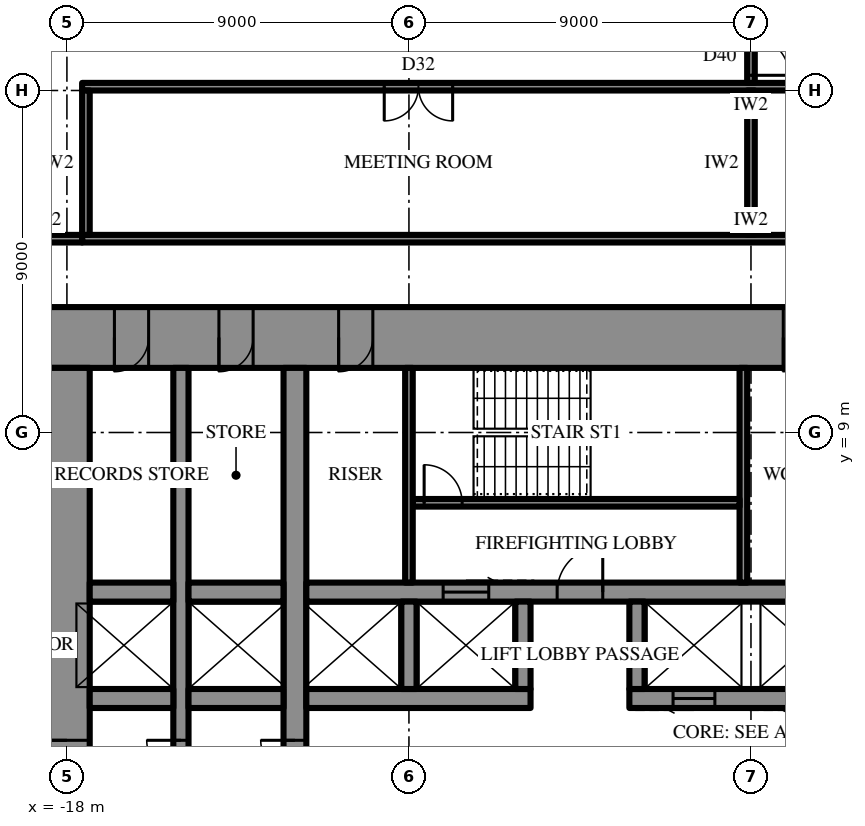
"""IFC4 building model, lengths in metres.
Left out: names, types, materials, properties, quantities, classifications, styles, units other than length and angle.
Written with IfcOpenShell. Run it as: python <this file> out.ifc"""

import sys

from ifc_helpers import new_model, si_unit, direction, frame, frame_2d, origin, place, context, subcontext, project, spatial, rectangle, extrude, element, fill, save


model = new_model("IFC4")
c1 = context("Model", 3, precision=1e-05, world=origin(), true_north=direction((0.0, 1.0)))
c2 = subcontext(c1, "Body", "Model", "MODEL_VIEW")
j1 = project(units=[si_unit("LENGTHUNIT", "METRE"), si_unit("PLANEANGLEUNIT", "RADIAN")], contexts=[c1])
p1 = place(None, origin())
s1 = spatial("IfcSite", under=j1, at=p1, CompositionType="ELEMENT")
p2 = place(p1, origin())
s2 = spatial("IfcBuilding", under=s1, at=p2, CompositionType="ELEMENT")
p3 = place(p2, frame((0.0, 0.0, 31.9)))
s3 = spatial("IfcBuildingStorey", under=s2, at=p3, CompositionType="ELEMENT", Elevation=31.9)
p4 = place(p3, frame((-18.6, 11.5, 0.0), z_axis=(0.0, 0.0, 1.0), x_axis=(1.0, 0.0, 0.0)))
e1 = element("IfcWall", 1, at=p4, inside=s3, PredefinedType="SHEAR", context=c2, shape_type="SweptSolid", body=[
    extrude(rectangle(XDim=37.2, YDim=1.6, at=frame_2d((18.6, 0.0))), origin(), (0.0, 0.0, 1.0), 4.2),
])
p5 = place(p4, frame((19.45, 0.0, 0.0)))
e2 = element("IfcOpeningElement", 2, at=p5, cuts=e1, PredefinedType="OPENING", context=c2, shape_type="SweptSolid", body=[
    extrude(rectangle(XDim=0.9, YDim=2.2, at=frame_2d((0.45, 1.1))), frame((0.0, 0.81, 0.0), z_axis=(0.0, -1.0, 0.0), x_axis=(1.0, 0.0, 0.0)), (0.0, 0.0, 1.0), 1.62),
])
p6 = place(p4, frame((22.45, 0.0, 0.0)))
e3 = element("IfcOpeningElement", 3, at=p6, cuts=e1, PredefinedType="OPENING", context=c2, shape_type="SweptSolid", body=[
    extrude(rectangle(XDim=0.9, YDim=2.2, at=frame_2d((0.45, 1.1))), frame((0.0, 0.81, 0.0), z_axis=(0.0, -1.0, 0.0), x_axis=(1.0, 0.0, 0.0)), (0.0, 0.0, 1.0), 1.62),
])
p7 = place(p4, frame((25.5, 0.0, 0.0)))
e4 = element("IfcOpeningElement", 4, at=p7, cuts=e1, PredefinedType="OPENING", context=c2, shape_type="SweptSolid", body=[
    extrude(rectangle(XDim=1.0, YDim=2.2, at=frame_2d((0.5, 1.1))), frame((0.0, 0.81, 0.0), z_axis=(0.0, -1.0, 0.0), x_axis=(1.0, 0.0, 0.0)), (0.0, 0.0, 1.0), 1.62),
])
p8 = place(p4, frame((1.85, 0.0, 0.0)))
e5 = element("IfcOpeningElement", 5, at=p8, cuts=e1, PredefinedType="OPENING", context=c2, shape_type="SweptSolid", body=[
    extrude(rectangle(XDim=0.9, YDim=2.2, at=frame_2d((0.45, 1.1))), frame((0.0, 0.81, 0.0), z_axis=(0.0, -1.0, 0.0), x_axis=(1.0, 0.0, 0.0)), (0.0, 0.0, 1.0), 1.62),
])
p9 = place(p4, frame((4.6, 0.0, 0.0)))
e6 = element("IfcOpeningElement", 6, at=p9, cuts=e1, PredefinedType="OPENING", context=c2, shape_type="SweptSolid", body=[
    extrude(rectangle(XDim=0.9, YDim=2.2, at=frame_2d((0.45, 1.1))), frame((0.0, 0.81, 0.0), z_axis=(0.0, -1.0, 0.0), x_axis=(1.0, 0.0, 0.0)), (0.0, 0.0, 1.0), 1.62),
])
p10 = place(p4, frame((7.75, 0.0, 0.0)))
e7 = element("IfcOpeningElement", 7, at=p10, cuts=e1, PredefinedType="OPENING", context=c2, shape_type="SweptSolid", body=[
    extrude(rectangle(XDim=0.9, YDim=2.2, at=frame_2d((0.45, 1.1))), frame((0.0, 0.81, 0.0), z_axis=(0.0, -1.0, 0.0), x_axis=(1.0, 0.0, 0.0)), (0.0, 0.0, 1.0), 1.62),
])
p11 = place(p4, frame((28.55, 0.0, 0.0)))
e8 = element("IfcOpeningElement", 8, at=p11, cuts=e1, PredefinedType="OPENING", context=c2, shape_type="SweptSolid", body=[
    extrude(rectangle(XDim=0.9, YDim=2.2, at=frame_2d((0.45, 1.1))), frame((0.0, 0.81, 0.0), z_axis=(0.0, -1.0, 0.0), x_axis=(1.0, 0.0, 0.0)), (0.0, 0.0, 1.0), 1.62),
])
p12 = place(p4, frame((31.7, 0.0, 0.0)))
e9 = element("IfcOpeningElement", 9, at=p12, cuts=e1, PredefinedType="OPENING", context=c2, shape_type="SweptSolid", body=[
    extrude(rectangle(XDim=0.9, YDim=2.2, at=frame_2d((0.45, 1.1))), frame((0.0, 0.81, 0.0), z_axis=(0.0, -1.0, 0.0), x_axis=(1.0, 0.0, 0.0)), (0.0, 0.0, 1.0), 1.62),
])
p13 = place(p4, frame((34.45, 0.0, 0.0)))
e10 = element("IfcOpeningElement", 10, at=p13, cuts=e1, PredefinedType="OPENING", context=c2, shape_type="SweptSolid", body=[
    extrude(rectangle(XDim=0.9, YDim=2.2, at=frame_2d((0.45, 1.1))), frame((0.0, 0.81, 0.0), z_axis=(0.0, -1.0, 0.0), x_axis=(1.0, 0.0, 0.0)), (0.0, 0.0, 1.0), 1.62),
])
p14 = place(p3, frame((-18.0, 10.7, 0.0), z_axis=(0.0, 0.0, 1.0), x_axis=(0.0, -1.0, 0.0)))
e11 = element("IfcWall", 11, at=p14, inside=s3, PredefinedType="SHEAR", context=c2, shape_type="SweptSolid", body=[
    extrude(rectangle(XDim=21.4, YDim=1.2, at=frame_2d((10.7, 0.0))), origin(), (0.0, 0.0, 1.0), 4.2),
])
p15 = place(p14, frame((9.8, 0.0, 0.0)))
e12 = element("IfcOpeningElement", 12, at=p15, cuts=e11, PredefinedType="OPENING", context=c2, shape_type="SweptSolid", body=[
    extrude(rectangle(XDim=1.8, YDim=2.4, at=frame_2d((0.9, 1.2))), frame((0.0, 0.61, 0.0), z_axis=(0.0, -1.0, 0.0), x_axis=(1.0, 0.0, 0.0)), (0.0, 0.0, 1.0), 1.22),
])
p16 = place(p3, frame((-12.0, -10.7, 0.0), z_axis=(0.0, 0.0, 1.0), x_axis=(0.0, 1.0, 0.0)))
e13 = element("IfcWall", 13, at=p16, inside=s3, PredefinedType="SHEAR", context=c2, shape_type="SweptSolid", body=[
    extrude(rectangle(XDim=21.4, YDim=0.6, at=frame_2d((10.7, 0.0))), origin(), (0.0, 0.0, 1.0), 4.2),
])
p17 = place(p16, frame((9.8, 0.0, 0.0)))
e14 = element("IfcOpeningElement", 14, at=p17, cuts=e13, PredefinedType="OPENING", context=c2, shape_type="SweptSolid", body=[
    extrude(rectangle(XDim=1.8, YDim=2.4, at=frame_2d((0.9, 1.2))), frame((0.0, 0.31, 0.0), z_axis=(0.0, -1.0, 0.0), x_axis=(1.0, 0.0, 0.0)), (0.0, 0.0, 1.0), 0.62),
])
p18 = place(p3, frame((-15.0, -10.7, 0.0), z_axis=(0.0, 0.0, 1.0), x_axis=(0.0, 1.0, 0.0)))
e15 = element("IfcWall", 15, at=p18, inside=s3, PredefinedType="SHEAR", context=c2, shape_type="SweptSolid", body=[
    extrude(rectangle(XDim=21.4, YDim=0.4, at=frame_2d((10.7, 0.0))), origin(), (0.0, 0.0, 1.0), 4.2),
])
p19 = place(p18, frame((9.8, 0.0, 0.0)))
e16 = element("IfcOpeningElement", 16, at=p19, cuts=e15, PredefinedType="OPENING", context=c2, shape_type="SweptSolid", body=[
    extrude(rectangle(XDim=1.8, YDim=2.4, at=frame_2d((0.9, 1.2))), frame((0.0, 0.21, 0.0), z_axis=(0.0, -1.0, 0.0), x_axis=(1.0, 0.0, 0.0)), (0.0, 0.0, 1.0), 0.42),
])
p20 = place(p3, frame((-17.4, 2.0, 0.0), z_axis=(0.0, 0.0, 1.0), x_axis=(1.0, 0.0, 0.0)))
e17 = element("IfcWall", 17, at=p20, inside=s3, PredefinedType="SHEAR", context=c2, shape_type="SweptSolid", body=[
    extrude(rectangle(XDim=2.2, YDim=0.5, at=frame_2d((1.1, 0.0))), origin(), (0.0, 0.0, 1.0), 4.2),
])
p21 = place(p3, frame((-14.8, 2.0, 0.0), z_axis=(0.0, 0.0, 1.0), x_axis=(1.0, 0.0, 0.0)))
e18 = element("IfcWall", 18, at=p21, inside=s3, PredefinedType="SHEAR", context=c2, shape_type="SweptSolid", body=[
    extrude(rectangle(XDim=2.5, YDim=0.5, at=frame_2d((1.25, 0.0))), origin(), (0.0, 0.0, 1.0), 4.2),
])
p22 = place(p3, frame((-11.7, 2.0, 0.0), z_axis=(0.0, 0.0, 1.0), x_axis=(1.0, 0.0, 0.0)))
e19 = element("IfcWall", 19, at=p22, inside=s3, PredefinedType="SHEAR", context=c2, shape_type="SweptSolid", body=[
    extrude(rectangle(XDim=5.9, YDim=0.5, at=frame_2d((2.95, 0.0))), origin(), (0.0, 0.0, 1.0), 4.2),
])
p23 = place(p3, frame((-3.2, 2.0, 0.0), z_axis=(0.0, 0.0, 1.0), x_axis=(1.0, 0.0, 0.0)))
e20 = element("IfcWall", 20, at=p23, inside=s3, PredefinedType="SHEAR", context=c2, shape_type="SweptSolid", body=[
    extrude(rectangle(XDim=14.9, YDim=0.5, at=frame_2d((7.45, 0.0))), origin(), (0.0, 0.0, 1.0), 4.2),
])
p24 = place(p23, frame((1.15, 0.0, 0.0)))
e21 = element("IfcOpeningElement", 21, at=p24, cuts=e20, PredefinedType="OPENING", context=c2, shape_type="SweptSolid", body=[
    extrude(rectangle(XDim=1.1, YDim=2.2, at=frame_2d((0.55, 1.1))), frame((0.0, 0.26, 0.0), z_axis=(0.0, -1.0, 0.0), x_axis=(1.0, 0.0, 0.0)), (0.0, 0.0, 1.0), 0.52),
])
p25 = place(p23, frame((4.15, 0.0, 0.0)))
e22 = element("IfcOpeningElement", 22, at=p25, cuts=e20, PredefinedType="OPENING", context=c2, shape_type="SweptSolid", body=[
    extrude(rectangle(XDim=1.1, YDim=2.2, at=frame_2d((0.55, 1.1))), frame((0.0, 0.26, 0.0), z_axis=(0.0, -1.0, 0.0), x_axis=(1.0, 0.0, 0.0)), (0.0, 0.0, 1.0), 0.52),
])
p26 = place(p23, frame((7.15, 0.0, 0.0)))
e23 = element("IfcOpeningElement", 23, at=p26, cuts=e20, PredefinedType="OPENING", context=c2, shape_type="SweptSolid", body=[
    extrude(rectangle(XDim=1.1, YDim=2.2, at=frame_2d((0.55, 1.1))), frame((0.0, 0.26, 0.0), z_axis=(0.0, -1.0, 0.0), x_axis=(1.0, 0.0, 0.0)), (0.0, 0.0, 1.0), 0.52),
])
p27 = place(p23, frame((10.15, 0.0, 0.0)))
e24 = element("IfcOpeningElement", 24, at=p27, cuts=e20, PredefinedType="OPENING", context=c2, shape_type="SweptSolid", body=[
    extrude(rectangle(XDim=1.1, YDim=2.2, at=frame_2d((0.55, 1.1))), frame((0.0, 0.26, 0.0), z_axis=(0.0, -1.0, 0.0), x_axis=(1.0, 0.0, 0.0)), (0.0, 0.0, 1.0), 0.52),
])
p28 = place(p3, frame((-17.4, 4.8, 0.0), z_axis=(0.0, 0.0, 1.0), x_axis=(1.0, 0.0, 0.0)))
e25 = element("IfcWall", 25, at=p28, inside=s3, PredefinedType="SHEAR", context=c2, shape_type="SweptSolid", body=[
    extrude(rectangle(XDim=2.2, YDim=0.5, at=frame_2d((1.1, 0.0))), origin(), (0.0, 0.0, 1.0), 4.2),
])
p29 = place(p3, frame((-14.8, 4.8, 0.0), z_axis=(0.0, 0.0, 1.0), x_axis=(1.0, 0.0, 0.0)))
e26 = element("IfcWall", 26, at=p29, inside=s3, PredefinedType="SHEAR", context=c2, shape_type="SweptSolid", body=[
    extrude(rectangle(XDim=2.5, YDim=0.5, at=frame_2d((1.25, 0.0))), origin(), (0.0, 0.0, 1.0), 4.2),
])
p30 = place(p3, frame((-11.7, 4.8, 0.0), z_axis=(0.0, 0.0, 1.0), x_axis=(1.0, 0.0, 0.0)))
e27 = element("IfcWall", 27, at=p30, inside=s3, PredefinedType="SHEAR", context=c2, shape_type="SweptSolid", body=[
    extrude(rectangle(XDim=23.4, YDim=0.5, at=frame_2d((11.7, 0.0))), origin(), (0.0, 0.0, 1.0), 4.2),
])
p31 = place(p30, frame((6.6, 0.0, 0.0)))
e28 = element("IfcOpeningElement", 28, at=p31, cuts=e27, PredefinedType="OPENING", context=c2, shape_type="SweptSolid", body=[
    extrude(rectangle(XDim=1.2, YDim=2.2, at=frame_2d((0.6, 1.1))), frame((0.0, 0.26, 0.0), z_axis=(0.0, -1.0, 0.0), x_axis=(1.0, 0.0, 0.0)), (0.0, 0.0, 1.0), 0.52),
])
p32 = place(p30, frame((3.6, 0.0, 0.0)))
e29 = element("IfcOpeningElement", 29, at=p32, cuts=e27, PredefinedType="OPENING", context=c2, shape_type="SweptSolid", body=[
    extrude(rectangle(XDim=1.2, YDim=2.2, at=frame_2d((0.6, 1.1))), frame((0.0, 0.26, 0.0), z_axis=(0.0, -1.0, 0.0), x_axis=(1.0, 0.0, 0.0)), (0.0, 0.0, 1.0), 0.52),
])
for number, where, z_axis, x_axis in (
    (30, (-9.0, 2.25, 0.0), (0.0, 0.0, 1.0), (0.0, 1.0, 0.0)),
    (31, (-6.0, 2.25, 0.0), (0.0, 0.0, 1.0), (0.0, 1.0, 0.0)),
    (32, (-3.0, 2.25, 0.0), (0.0, 0.0, 1.0), (0.0, 1.0, 0.0)),
):
    element("IfcWall", number, at=place(p3, frame(where, z_axis=z_axis, x_axis=x_axis)), inside=s3, PredefinedType="SHEAR", context=c2, shape_type="SweptSolid", body=[
        extrude(rectangle(XDim=2.3, YDim=0.4, at=frame_2d((1.15, 0.0))), origin(), (0.0, 0.0, 1.0), 4.2),
    ])
p33 = place(p3, frame((-0.2, 5.05, 0.0), z_axis=(0.0, 0.0, 1.0), x_axis=(0.0, 1.0, 0.0)))
e33 = element("IfcWall", 33, at=p33, inside=s3, PredefinedType="SHEAR", context=c2, shape_type="SweptSolid", body=[
    extrude(rectangle(XDim=5.65, YDim=0.2, at=frame_2d((2.825, 0.0))), origin(), (0.0, 0.0, 1.0), 4.2),
])
p34 = place(p3, frame((-8.9, 7.15, 0.0), z_axis=(0.0, 0.0, 1.0), x_axis=(1.0, 0.0, 0.0)))
e34 = element("IfcWall", 34, at=p34, inside=s3, PredefinedType="SHEAR", context=c2, shape_type="SweptSolid", body=[
    extrude(rectangle(XDim=8.6, YDim=0.2, at=frame_2d((4.3, 0.0))), origin(), (0.0, 0.0, 1.0), 4.2),
])
p35 = place(p34, frame((0.3, 0.0, 0.0)))
e35 = element("IfcOpeningElement", 35, at=p35, cuts=e34, PredefinedType="OPENING", context=c2, shape_type="SweptSolid", body=[
    extrude(rectangle(XDim=1.0, YDim=2.2, at=frame_2d((0.5, 1.1))), frame((0.0, 0.11, 0.0), z_axis=(0.0, -1.0, 0.0), x_axis=(1.0, 0.0, 0.0)), (0.0, 0.0, 1.0), 0.22),
])
p36 = place(p3, frame((-9.0, 5.05, 0.0), z_axis=(0.0, 0.0, 1.0), x_axis=(0.0, 1.0, 0.0)))
e36 = element("IfcWall", 36, at=p36, inside=s3, PredefinedType="PARTITIONING", context=c2, shape_type="SweptSolid", body=[
    extrude(rectangle(XDim=5.65, YDim=0.2, at=frame_2d((2.825, 0.0))), origin(), (0.0, 0.0, 1.0), 4.0),
])
p37 = place(p3, frame((-17.6, 14.1, 0.0), z_axis=(0.0, 0.0, 1.0), x_axis=(1.0, 0.0, 0.0)))
e37 = element("IfcWall", 37, at=p37, inside=s3, PredefinedType="PARTITIONING", context=c2, shape_type="SweptSolid", body=[
    extrude(rectangle(XDim=35.2, YDim=0.2, at=frame_2d((17.6, 0.0))), origin(), (0.0, 0.0, 1.0), 4.0),
])
p38 = place(p3, frame((-17.6, 18.1, 0.0), z_axis=(0.0, 0.0, 1.0), x_axis=(1.0, 0.0, 0.0)))
e38 = element("IfcWall", 38, at=p38, inside=s3, PredefinedType="PARTITIONING", context=c2, shape_type="SweptSolid", body=[
    extrude(rectangle(XDim=35.2, YDim=0.2, at=frame_2d((17.6, 0.0))), origin(), (0.0, 0.0, 1.0), 4.0),
])
p39 = place(p38, frame((7.95, 0.0, 0.0)))
e39 = element("IfcOpeningElement", 39, at=p39, cuts=e38, PredefinedType="OPENING", context=c2, shape_type="SweptSolid", body=[
    extrude(rectangle(XDim=1.8, YDim=2.4, at=frame_2d((0.9, 1.2))), frame((0.0, 0.11, 0.0), z_axis=(0.0, -1.0, 0.0), x_axis=(1.0, 0.0, 0.0)), (0.0, 0.0, 1.0), 0.22),
])
p40 = place(p38, frame((25.45, 0.0, 0.0)))
e40 = element("IfcOpeningElement", 40, at=p40, cuts=e38, PredefinedType="OPENING", context=c2, shape_type="SweptSolid", body=[
    extrude(rectangle(XDim=1.8, YDim=2.4, at=frame_2d((0.9, 1.2))), frame((0.0, 0.11, 0.0), z_axis=(0.0, -1.0, 0.0), x_axis=(1.0, 0.0, 0.0)), (0.0, 0.0, 1.0), 0.22),
])
p41 = place(p3, frame((-17.5, 14.2, 0.0), z_axis=(0.0, 0.0, 1.0), x_axis=(0.0, 1.0, 0.0)))
e41 = element("IfcWall", 41, at=p41, inside=s3, PredefinedType="PARTITIONING", context=c2, shape_type="SweptSolid", body=[
    extrude(rectangle(XDim=3.8, YDim=0.2, at=frame_2d((1.9, 0.0))), origin(), (0.0, 0.0, 1.0), 4.0),
])
p42 = place(p3, frame((0.0, 14.2, 0.0), z_axis=(0.0, 0.0, 1.0), x_axis=(0.0, 1.0, 0.0)))
e42 = element("IfcWall", 42, at=p42, inside=s3, PredefinedType="PARTITIONING", context=c2, shape_type="SweptSolid", body=[
    extrude(rectangle(XDim=3.8, YDim=0.2, at=frame_2d((1.9, 0.0))), origin(), (0.0, 0.0, 1.0), 2.944),
])
p43 = place(p3, frame((-19.6, 14.1, 0.0), z_axis=(0.0, 0.0, 1.0), x_axis=(1.0, 0.0, 0.0)))
e43 = element("IfcWall", 43, at=p43, inside=s3, PredefinedType="PARTITIONING", context=c2, shape_type="SweptSolid", body=[
    extrude(rectangle(XDim=2.0, YDim=0.2, at=frame_2d((1.0, 0.0))), origin(), (0.0, 0.0, 1.0), 4.0),
])
p44 = place(p3, frame((0.0, 18.2, 0.0), z_axis=(0.0, 0.0, 1.0), x_axis=(0.0, 1.0, 0.0)))
e44 = element("IfcWall", 44, at=p44, inside=s3, PredefinedType="PARTITIONING", context=c2, shape_type="SweptSolid", body=[
    extrude(rectangle(XDim=6.7, YDim=0.2, at=frame_2d((3.35, 0.0))), origin(), (0.0, 0.0, 1.0), 2.944),
])
p45 = place(p44, frame((0.2, 0.0, 0.0)))
e45 = element("IfcOpeningElement", 45, at=p45, cuts=e44, PredefinedType="OPENING", context=c2, shape_type="SweptSolid", body=[
    extrude(rectangle(XDim=1.0, YDim=2.2, at=frame_2d((0.5, 1.1))), frame((0.0, 0.11, 0.0), z_axis=(0.0, -1.0, 0.0), x_axis=(1.0, 0.0, 0.0)), (0.0, 0.0, 1.0), 0.22),
])
p46 = place(p15, frame((1.8, 0.0, 0.0), z_axis=(0.0, 0.0, 1.0), x_axis=(-1.0, 0.0, 0.0)))
e46 = element("IfcDoor", 46, at=p46, inside=s3, OperationType="DOUBLE_DOOR_SINGLE_SWING", PredefinedType="DOOR", context=c2, shape_type="SweptSolid", body=[
    extrude(rectangle(XDim=1.8, YDim=2.4, at=frame_2d((0.9, 1.2))), frame((0.0, 0.025, 0.0), z_axis=(0.0, -1.0, 0.0), x_axis=(1.0, 0.0, 0.0)), (0.0, 0.0, 1.0), 0.05),
])
fill(e12, e46)
p47 = place(p31, origin())
e47 = element("IfcDoor", 47, at=p47, inside=s3, OperationType="SINGLE_SWING_LEFT", PredefinedType="DOOR", context=c2, shape_type="SweptSolid", body=[
    extrude(rectangle(XDim=1.2, YDim=2.2, at=frame_2d((0.6, 1.1))), frame((0.0, 0.025, 0.0), z_axis=(0.0, -1.0, 0.0), x_axis=(1.0, 0.0, 0.0)), (0.0, 0.0, 1.0), 0.05),
])
fill(e28, e47)
p48 = place(p35, origin())
e48 = element("IfcDoor", 48, at=p48, inside=s3, OperationType="SINGLE_SWING_RIGHT", PredefinedType="DOOR", context=c2, shape_type="SweptSolid", body=[
    extrude(rectangle(XDim=1.0, YDim=2.2, at=frame_2d((0.5, 1.1))), frame((0.0, 0.025, 0.0), z_axis=(0.0, -1.0, 0.0), x_axis=(1.0, 0.0, 0.0)), (0.0, 0.0, 1.0), 0.05),
])
fill(e35, e48)
p49 = place(p5, frame((0.9, 0.0, 0.0), z_axis=(0.0, 0.0, 1.0), x_axis=(-1.0, 0.0, 0.0)))
e49 = element("IfcDoor", 49, at=p49, inside=s3, OperationType="SINGLE_SWING_LEFT", PredefinedType="DOOR", context=c2, shape_type="SweptSolid", body=[
    extrude(rectangle(XDim=0.9, YDim=2.2, at=frame_2d((0.45, 1.1))), frame((0.0, 0.025, 0.0), z_axis=(0.0, -1.0, 0.0), x_axis=(1.0, 0.0, 0.0)), (0.0, 0.0, 1.0), 0.05),
])
fill(e2, e49)
p50 = place(p8, frame((0.9, 0.0, 0.0), z_axis=(0.0, 0.0, 1.0), x_axis=(-1.0, 0.0, 0.0)))
e50 = element("IfcDoor", 50, at=p50, inside=s3, OperationType="SINGLE_SWING_LEFT", PredefinedType="DOOR", context=c2, shape_type="SweptSolid", body=[
    extrude(rectangle(XDim=0.9, YDim=2.2, at=frame_2d((0.45, 1.1))), frame((0.0, 0.025, 0.0), z_axis=(0.0, -1.0, 0.0), x_axis=(1.0, 0.0, 0.0)), (0.0, 0.0, 1.0), 0.05),
])
fill(e5, e50)
p51 = place(p9, frame((0.9, 0.0, 0.0), z_axis=(0.0, 0.0, 1.0), x_axis=(-1.0, 0.0, 0.0)))
e51 = element("IfcDoor", 51, at=p51, inside=s3, OperationType="SINGLE_SWING_LEFT", PredefinedType="DOOR", context=c2, shape_type="SweptSolid", body=[
    extrude(rectangle(XDim=0.9, YDim=2.2, at=frame_2d((0.45, 1.1))), frame((0.0, 0.025, 0.0), z_axis=(0.0, -1.0, 0.0), x_axis=(1.0, 0.0, 0.0)), (0.0, 0.0, 1.0), 0.05),
])
fill(e6, e51)
p52 = place(p10, frame((0.9, 0.0, 0.0), z_axis=(0.0, 0.0, 1.0), x_axis=(-1.0, 0.0, 0.0)))
e52 = element("IfcDoor", 52, at=p52, inside=s3, OperationType="SINGLE_SWING_LEFT", PredefinedType="DOOR", context=c2, shape_type="SweptSolid", body=[
    extrude(rectangle(XDim=0.9, YDim=2.2, at=frame_2d((0.45, 1.1))), frame((0.0, 0.025, 0.0), z_axis=(0.0, -1.0, 0.0), x_axis=(1.0, 0.0, 0.0)), (0.0, 0.0, 1.0), 0.05),
])
fill(e7, e52)
p53 = place(p17, origin())
e53 = element("IfcDoor", 53, at=p53, inside=s3, OperationType="DOUBLE_DOOR_SINGLE_SWING", PredefinedType="DOOR", context=c2, shape_type="SweptSolid", body=[
    extrude(rectangle(XDim=1.8, YDim=2.4, at=frame_2d((0.9, 1.2))), frame((0.0, 0.025, 0.0), z_axis=(0.0, -1.0, 0.0), x_axis=(1.0, 0.0, 0.0)), (0.0, 0.0, 1.0), 0.05),
])
fill(e14, e53)
p54 = place(p19, origin())
e54 = element("IfcDoor", 54, at=p54, inside=s3, OperationType="DOUBLE_DOOR_SINGLE_SWING", PredefinedType="DOOR", context=c2, shape_type="SweptSolid", body=[
    extrude(rectangle(XDim=1.8, YDim=2.4, at=frame_2d((0.9, 1.2))), frame((0.0, 0.025, 0.0), z_axis=(0.0, -1.0, 0.0), x_axis=(1.0, 0.0, 0.0)), (0.0, 0.0, 1.0), 0.05),
])
fill(e16, e54)
p55 = place(p32, origin())
e55 = element("IfcDoor", 55, at=p55, inside=s3, OperationType="SLIDING_TO_LEFT", PredefinedType="DOOR", context=c2, shape_type="SweptSolid", body=[
    extrude(rectangle(XDim=1.2, YDim=2.2, at=frame_2d((0.6, 1.1))), frame((0.0, 0.025, 0.0), z_axis=(0.0, -1.0, 0.0), x_axis=(1.0, 0.0, 0.0)), (0.0, 0.0, 1.0), 0.05),
])
fill(e29, e55)
p56 = place(p24, frame((1.1, 0.0, 0.0), z_axis=(0.0, 0.0, 1.0), x_axis=(-1.0, 0.0, 0.0)))
e56 = element("IfcDoor", 56, at=p56, inside=s3, OperationType="SLIDING_TO_LEFT", PredefinedType="DOOR", context=c2, shape_type="SweptSolid", body=[
    extrude(rectangle(XDim=1.1, YDim=2.2, at=frame_2d((0.55, 1.1))), frame((0.0, 0.025, 0.0), z_axis=(0.0, -1.0, 0.0), x_axis=(1.0, 0.0, 0.0)), (0.0, 0.0, 1.0), 0.05),
])
fill(e21, e56)
p57 = place(p39, frame((1.8, 0.0, 0.0), z_axis=(0.0, 0.0, 1.0), x_axis=(-1.0, 0.0, 0.0)))
e57 = element("IfcDoor", 57, at=p57, inside=s3, OperationType="DOUBLE_DOOR_SINGLE_SWING", PredefinedType="DOOR", context=c2, shape_type="SweptSolid", body=[
    extrude(rectangle(XDim=1.8, YDim=2.4, at=frame_2d((0.9, 1.2))), frame((0.0, 0.025, 0.0), z_axis=(0.0, -1.0, 0.0), x_axis=(1.0, 0.0, 0.0)), (0.0, 0.0, 1.0), 0.05),
])
fill(e39, e57)
p58 = place(p45, frame((1.0, 0.0, 0.0), z_axis=(0.0, 0.0, 1.0), x_axis=(-1.0, 0.0, 0.0)))
e58 = element("IfcDoor", 58, at=p58, inside=s3, OperationType="SINGLE_SWING_LEFT", PredefinedType="DOOR", context=c2, shape_type="SweptSolid", body=[
    extrude(rectangle(XDim=1.0, YDim=2.2, at=frame_2d((0.5, 1.1))), frame((0.0, 0.025, 0.0), z_axis=(0.0, -1.0, 0.0), x_axis=(1.0, 0.0, 0.0)), (0.0, 0.0, 1.0), 0.05),
])
fill(e45, e58)
save(model, sys.argv[1])
